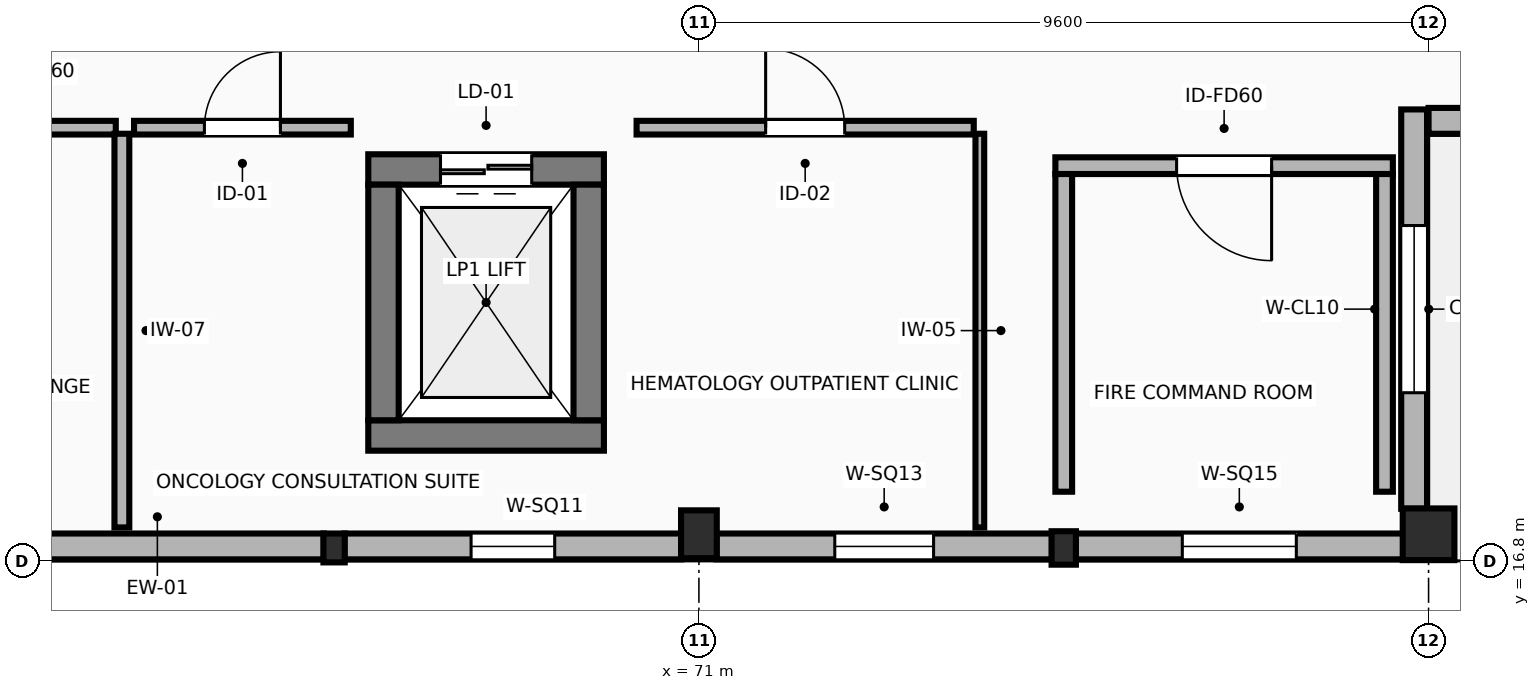
"""IFC4 building model, lengths in metres.
Left out: names, types, materials, properties, quantities, classifications, styles, units other than length and angle.
Written with IfcOpenShell. Run it as: python <this file> out.ifc"""

import sys

from ifc_helpers import new_model, si_unit, direction, frame, frame_2d, origin, origin_2d, place, context, subcontext, project, spatial, rectangle, extrude, element, fill, save


model = new_model("IFC4")
c1 = context("Model", 3, precision=1e-05, world=origin(), true_north=direction((0.0, 1.0)))
c2 = subcontext(c1, "Body", "Model", "MODEL_VIEW")
j1 = project(units=[si_unit("LENGTHUNIT", "METRE"), si_unit("PLANEANGLEUNIT", "RADIAN")], contexts=[c1])
p1 = place(None, origin())
s1 = spatial("IfcSite", under=j1, at=p1, CompositionType="ELEMENT")
p2 = place(p1, origin())
s2 = spatial("IfcBuilding", under=s1, at=p2, CompositionType="ELEMENT")
p3 = place(p2, origin())
s3 = spatial("IfcBuildingStorey", under=s2, at=p3, CompositionType="ELEMENT", Elevation=0.0)
p4 = place(p3, frame((71.0, 17.15, 0.0), z_axis=(0.0, 0.0, 1.0), x_axis=(1.0, 0.0, 0.0)))
e1 = element("IfcColumn", 1, at=p4, inside=s3, PredefinedType="COLUMN", context=c2, shape_type="SweptSolid", body=[
    extrude(rectangle(XDim=0.47, YDim=0.63, at=origin_2d()), origin(), (0.0, 0.0, 1.0), 5.4),
])
p5 = place(p3, frame((80.6, 17.15, 0.0), z_axis=(0.0, 0.0, 1.0), x_axis=(1.0, 0.0, 0.0)))
e2 = element("IfcColumn", 2, at=p5, inside=s3, PredefinedType="COLUMN", context=c2, shape_type="SweptSolid", body=[
    extrude(rectangle(XDim=0.68, YDim=0.68, at=origin_2d()), origin(), (0.0, 0.0, 1.0), 5.4),
])
p6 = place(p3, frame((66.2, 16.97, -1.75), z_axis=(0.0, 0.0, 1.0), x_axis=(1.0, 0.0, 0.0)))
e3 = element("IfcColumn", 3, at=p6, inside=s3, PredefinedType="PILASTER", context=c2, shape_type="SweptSolid", body=[
    extrude(rectangle(XDim=0.28, YDim=0.38, at=origin_2d()), origin(), (0.0, 0.0, 1.0), 7.15),
])
p7 = place(p3, frame((75.8, 16.97, -1.75), z_axis=(0.0, 0.0, 1.0), x_axis=(1.0, 0.0, 0.0)))
e4 = element("IfcColumn", 4, at=p7, inside=s3, PredefinedType="PILASTER", context=c2, shape_type="SweptSolid", body=[
    extrude(rectangle(XDim=0.32, YDim=0.44, at=origin_2d()), origin(), (0.0, 0.0, 1.0), 7.15),
])
p8 = place(p3, frame((61.685, 16.99, 0.0), z_axis=(0.0, 0.0, 1.0), x_axis=(1.0, 0.0, 0.0)))
e5 = element("IfcWall", 5, at=p8, inside=s3, PredefinedType="STANDARD", context=c2, shape_type="SweptSolid", body=[
    extrude(rectangle(XDim=4.38, YDim=0.34, at=frame_2d((2.19, 0.0))), origin(), (0.0, 0.0, 1.0), 4.385),
])
p9 = place(p3, frame((66.335, 16.99, 0.0), z_axis=(0.0, 0.0, 1.0), x_axis=(1.0, 0.0, 0.0)))
e6 = element("IfcWall", 6, at=p9, inside=s3, PredefinedType="STANDARD", context=c2, shape_type="SweptSolid", body=[
    extrude(rectangle(XDim=4.435, YDim=0.34, at=frame_2d((2.218, 0.0))), origin(), (0.0, 0.0, 1.0), 4.385),
])
p10 = place(p9, frame((1.667, 0.0, 1.35)))
e7 = element("IfcOpeningElement", 7, at=p10, cuts=e6, PredefinedType="OPENING", context=c2, shape_type="SweptSolid", body=[
    extrude(rectangle(XDim=1.1, YDim=1.1, at=frame_2d((0.55, 0.55))), frame((0.0, 0.18, 0.0), z_axis=(0.0, -1.0, 0.0), x_axis=(1.0, 0.0, 0.0)), (0.0, 0.0, 1.0), 0.36),
])
p11 = place(p3, frame((71.23, 16.99, 0.0), z_axis=(0.0, 0.0, 1.0), x_axis=(1.0, 0.0, 0.0)))
e8 = element("IfcWall", 8, at=p11, inside=s3, PredefinedType="STANDARD", context=c2, shape_type="SweptSolid", body=[
    extrude(rectangle(XDim=4.415, YDim=0.34, at=frame_2d((2.208, 0.0))), origin(), (0.0, 0.0, 1.0), 4.385),
])
p12 = place(p11, frame((1.558, 0.0, 0.95)))
e9 = element("IfcOpeningElement", 9, at=p12, cuts=e8, PredefinedType="OPENING", context=c2, shape_type="SweptSolid", body=[
    extrude(rectangle(XDim=1.3, YDim=1.3, at=frame_2d((0.65, 0.65))), frame((0.0, 0.18, 0.0), z_axis=(0.0, -1.0, 0.0), x_axis=(1.0, 0.0, 0.0)), (0.0, 0.0, 1.0), 0.36),
])
p13 = place(p3, frame((75.955, 16.99, 0.0), z_axis=(0.0, 0.0, 1.0), x_axis=(1.0, 0.0, 0.0)))
e10 = element("IfcWall", 10, at=p13, inside=s3, PredefinedType="STANDARD", context=c2, shape_type="SweptSolid", body=[
    extrude(rectangle(XDim=4.31, YDim=0.34, at=frame_2d((2.155, 0.0))), origin(), (0.0, 0.0, 1.0), 4.385),
])
p14 = place(p13, frame((1.405, 0.0, 0.95)))
e11 = element("IfcOpeningElement", 11, at=p14, cuts=e10, PredefinedType="OPENING", context=c2, shape_type="SweptSolid", body=[
    extrude(rectangle(XDim=1.5, YDim=1.5, at=frame_2d((0.75, 0.75))), frame((0.0, 0.18, 0.0), z_axis=(0.0, -1.0, 0.0), x_axis=(1.0, 0.0, 0.0)), (0.0, 0.0, 1.0), 0.36),
])
p15 = place(p3, frame((80.41, 17.485, 0.0), z_axis=(0.0, 0.0, 1.0), x_axis=(0.0, 1.0, 0.0)))
e12 = element("IfcWall", 12, at=p15, inside=s3, PredefinedType="STANDARD", context=c2, shape_type="SweptSolid", body=[
    extrude(rectangle(XDim=5.255, YDim=0.34, at=frame_2d((2.627, 0.0))), origin(), (0.0, 0.0, 1.0), 4.605),
])
p16 = place(p15, frame((1.528, 0.0, 1.75)))
e13 = element("IfcOpeningElement", 13, at=p16, cuts=e12, PredefinedType="OPENING", context=c2, shape_type="SweptSolid", body=[
    extrude(rectangle(XDim=2.2, YDim=0.85, at=frame_2d((1.1, 0.425))), frame((0.0, 0.18, 0.0), z_axis=(0.0, -1.0, 0.0), x_axis=(1.0, 0.0, 0.0)), (0.0, 0.0, 1.0), 0.36),
])
p17 = place(p3, frame((80.6, 22.59, 0.0), z_axis=(0.0, 0.0, 1.0), x_axis=(1.0, 0.0, 0.0)))
e14 = element("IfcWall", 14, at=p17, inside=s3, PredefinedType="STANDARD", context=c2, shape_type="SweptSolid", body=[
    extrude(rectangle(XDim=9.6, YDim=0.34, at=frame_2d((4.8, 0.0))), origin(), (0.0, 0.0, 1.0), 5.12),
])
p18 = place(p17, frame((3.7, 0.0, 0.0)))
e15 = element("IfcOpeningElement", 15, at=p18, cuts=e14, PredefinedType="OPENING", context=c2, shape_type="SweptSolid", body=[
    extrude(rectangle(XDim=2.2, YDim=2.5, at=frame_2d((1.1, 1.25))), frame((0.0, 0.18, 0.0), z_axis=(0.0, -1.0, 0.0), x_axis=(1.0, 0.0, 0.0)), (0.0, 0.0, 1.0), 0.36),
])
p19 = place(p3, frame((66.65, 18.45, 0.0), z_axis=(0.0, 0.0, 1.0), x_axis=(1.0, 0.0, 0.0)))
e16 = element("IfcWall", 16, at=p19, inside=s3, PredefinedType="SHEAR", context=c2, shape_type="SweptSolid", body=[
    extrude(rectangle(XDim=3.1, YDim=0.4, at=frame_2d((1.55, 0.0))), origin(), (0.0, 0.0, 1.0), 5.4),
])
p20 = place(p3, frame((69.75, 21.95, 0.0), z_axis=(0.0, 0.0, 1.0), x_axis=(-1.0, 0.0, 0.0)))
e17 = element("IfcWall", 17, at=p20, inside=s3, PredefinedType="SHEAR", context=c2, shape_type="SweptSolid", body=[
    extrude(rectangle(XDim=3.1, YDim=0.4, at=frame_2d((1.55, 0.0))), origin(), (0.0, 0.0, 1.0), 5.4),
])
p21 = place(p20, frame((0.95, 0.0, 0.0)))
e18 = element("IfcOpeningElement", 18, at=p21, cuts=e17, PredefinedType="OPENING", context=c2, shape_type="SweptSolid", body=[
    extrude(rectangle(XDim=1.2, YDim=2.2, at=frame_2d((0.6, 1.1))), frame((0.0, 0.21, 0.0), z_axis=(0.0, -1.0, 0.0), x_axis=(1.0, 0.0, 0.0)), (0.0, 0.0, 1.0), 0.42),
])
for number, where, z_axis, x_axis in (
    (19, (66.85, 18.65, 0.0), (0.0, 0.0, 1.0), (0.0, 1.0, 0.0)),
    (20, (69.55, 21.75, 0.0), (0.0, 0.0, 1.0), (0.0, -1.0, 0.0)),
):
    element("IfcWall", number, at=place(p3, frame(where, z_axis=z_axis, x_axis=x_axis)), inside=s3, PredefinedType="SHEAR", context=c2, shape_type="SweptSolid", body=[
        extrude(rectangle(XDim=3.1, YDim=0.4, at=frame_2d((1.55, 0.0))), origin(), (0.0, 0.0, 1.0), 5.4),
    ])
p22 = place(p3, frame((80.13, 22.0, 0.0), z_axis=(0.0, 0.0, 1.0), x_axis=(-1.0, 0.0, 0.0)))
e21 = element("IfcWall", 21, at=p22, inside=s3, PredefinedType="PARTITIONING", context=c2, shape_type="SweptSolid", body=[
    extrude(rectangle(XDim=4.44, YDim=0.22, at=frame_2d((2.22, 0.0))), origin(), (0.0, 0.0, 1.0), 5.12),
])
p23 = place(p22, frame((1.595, 0.0, 0.0)))
e22 = element("IfcOpeningElement", 22, at=p23, cuts=e21, PredefinedType="OPENING", context=c2, shape_type="SweptSolid", body=[
    extrude(rectangle(XDim=1.25, YDim=2.2, at=frame_2d((0.625, 1.1))), frame((0.0, 0.12, 0.0), z_axis=(0.0, -1.0, 0.0), x_axis=(1.0, 0.0, 0.0)), (0.0, 0.0, 1.0), 0.24),
])
for number, where, z_axis, x_axis in (
    (23, (75.8, 17.71, 0.0), (0.0, 0.0, 1.0), (0.0, 1.0, 0.0)),
    (24, (80.02, 21.89, 0.0), (0.0, 0.0, 1.0), (0.0, -1.0, 0.0)),
):
    element("IfcWall", number, at=place(p3, frame(where, z_axis=z_axis, x_axis=x_axis)), inside=s3, PredefinedType="PARTITIONING", context=c2, shape_type="SweptSolid", body=[
        extrude(rectangle(XDim=4.18, YDim=0.22, at=frame_2d((2.09, 0.0))), origin(), (0.0, 0.0, 1.0), 5.12),
    ])
p24 = place(p3, frame((57.924, 22.5, 0.0), z_axis=(0.0, 0.0, 1.0), x_axis=(1.0, 0.0, 0.0)))
e25 = element("IfcWall", 25, at=p24, inside=s3, PredefinedType="PARTITIONING", context=c2, shape_type="SweptSolid", body=[
    extrude(rectangle(XDim=5.404, YDim=0.18, at=frame_2d((2.702, 0.0))), origin(), (0.0, 0.0, 1.0), 5.12),
])
p25 = place(p24, frame((2.112, 0.0, 0.0)))
e26 = element("IfcOpeningElement", 26, at=p25, cuts=e25, PredefinedType="OPENING", context=c2, shape_type="SweptSolid", body=[
    extrude(rectangle(XDim=1.18, YDim=2.18, at=frame_2d((0.59, 1.09))), frame((0.0, 0.1, 0.0), z_axis=(0.0, -1.0, 0.0), x_axis=(1.0, 0.0, 0.0)), (0.0, 0.0, 1.0), 0.2),
])
p26 = place(p3, frame((63.408, 22.42, 0.0), z_axis=(0.0, 0.0, 1.0), x_axis=(0.0, -1.0, 0.0)))
e27 = element("IfcWall", 27, at=p26, inside=s3, PredefinedType="PARTITIONING", context=c2, shape_type="SweptSolid", body=[
    extrude(rectangle(XDim=5.18, YDim=0.195, at=frame_2d((2.59, 0.0))), origin(), (0.0, 0.0, 1.0), 5.12),
])
p27 = place(p3, frame((63.568, 22.5, 0.0), z_axis=(0.0, 0.0, 1.0), x_axis=(1.0, 0.0, 0.0)))
e28 = element("IfcWall", 28, at=p27, inside=s3, PredefinedType="PARTITIONING", context=c2, shape_type="SweptSolid", body=[
    extrude(rectangle(XDim=2.852, YDim=0.18, at=frame_2d((1.426, 0.0))), origin(), (0.0, 0.0, 1.0), 5.12),
])
p28 = place(p27, frame((0.926, 0.0, 0.0)))
e29 = element("IfcOpeningElement", 29, at=p28, cuts=e28, PredefinedType="OPENING", context=c2, shape_type="SweptSolid", body=[
    extrude(rectangle(XDim=1.0, YDim=2.15, at=frame_2d((0.5, 1.075))), frame((0.0, 0.1, 0.0), z_axis=(0.0, -1.0, 0.0), x_axis=(1.0, 0.0, 0.0)), (0.0, 0.0, 1.0), 0.2),
])
p29 = place(p3, frame((70.18, 22.5, 0.0), z_axis=(0.0, 0.0, 1.0), x_axis=(1.0, 0.0, 0.0)))
e30 = element("IfcWall", 30, at=p29, inside=s3, PredefinedType="PARTITIONING", context=c2, shape_type="SweptSolid", body=[
    extrude(rectangle(XDim=4.436, YDim=0.18, at=frame_2d((2.218, 0.0))), origin(), (0.0, 0.0, 1.0), 5.12),
])
p30 = place(p29, frame((1.698, 0.0, 0.0)))
e31 = element("IfcOpeningElement", 31, at=p30, cuts=e30, PredefinedType="OPENING", context=c2, shape_type="SweptSolid", body=[
    extrude(rectangle(XDim=1.04, YDim=2.15, at=frame_2d((0.52, 1.075))), frame((0.0, 0.1, 0.0), z_axis=(0.0, -1.0, 0.0), x_axis=(1.0, 0.0, 0.0)), (0.0, 0.0, 1.0), 0.2),
])
p31 = place(p3, frame((74.696, 22.42, 0.0), z_axis=(0.0, 0.0, 1.0), x_axis=(0.0, -1.0, 0.0)))
e32 = element("IfcWall", 32, at=p31, inside=s3, PredefinedType="PARTITIONING", context=c2, shape_type="SweptSolid", body=[
    extrude(rectangle(XDim=5.18, YDim=0.115, at=frame_2d((2.59, 0.0))), origin(), (0.0, 0.0, 1.0), 5.12),
])
p32 = place(p10, origin())
e33 = element("IfcWindow", 33, at=p32, inside=s3, PartitioningType="SINGLE_PANEL", PredefinedType="WINDOW", context=c2, shape_type="SweptSolid", body=[
    extrude(rectangle(XDim=1.1, YDim=1.1, at=frame_2d((0.55, 0.55))), frame((0.0, 0.03, 0.0), z_axis=(0.0, -1.0, 0.0), x_axis=(1.0, 0.0, 0.0)), (0.0, 0.0, 1.0), 0.06),
])
fill(e7, e33)
p33 = place(p12, origin())
e34 = element("IfcWindow", 34, at=p33, inside=s3, PartitioningType="SINGLE_PANEL", PredefinedType="WINDOW", context=c2, shape_type="SweptSolid", body=[
    extrude(rectangle(XDim=1.3, YDim=1.3, at=frame_2d((0.65, 0.65))), frame((0.0, 0.03, 0.0), z_axis=(0.0, -1.0, 0.0), x_axis=(1.0, 0.0, 0.0)), (0.0, 0.0, 1.0), 0.06),
])
fill(e9, e34)
p34 = place(p14, origin())
e35 = element("IfcWindow", 35, at=p34, inside=s3, PartitioningType="SINGLE_PANEL", PredefinedType="WINDOW", context=c2, shape_type="SweptSolid", body=[
    extrude(rectangle(XDim=1.5, YDim=1.5, at=frame_2d((0.75, 0.75))), frame((0.0, 0.03, 0.0), z_axis=(0.0, -1.0, 0.0), x_axis=(1.0, 0.0, 0.0)), (0.0, 0.0, 1.0), 0.06),
])
fill(e11, e35)
p35 = place(p16, origin())
e36 = element("IfcWindow", 36, at=p35, inside=s3, PartitioningType="SINGLE_PANEL", PredefinedType="WINDOW", context=c2, shape_type="SweptSolid", body=[
    extrude(rectangle(XDim=2.2, YDim=0.85, at=frame_2d((1.1, 0.425))), frame((0.0, 0.03, 0.0), z_axis=(0.0, -1.0, 0.0), x_axis=(1.0, 0.0, 0.0)), (0.0, 0.0, 1.0), 0.06),
])
fill(e13, e36)
p36 = place(p21, origin())
e37 = element("IfcDoor", 37, at=p36, inside=s3, OperationType="DOUBLE_DOOR_SLIDING", PredefinedType="DOOR", context=c2, shape_type="SweptSolid", body=[
    extrude(rectangle(XDim=1.2, YDim=2.2, at=frame_2d((0.6, 1.1))), frame((0.0, 0.025, 0.0), z_axis=(0.0, -1.0, 0.0), x_axis=(1.0, 0.0, 0.0)), (0.0, 0.0, 1.0), 0.05),
])
fill(e18, e37)
p37 = place(p23, origin())
e38 = element("IfcDoor", 38, at=p37, inside=s3, OperationType="SINGLE_SWING_LEFT", PredefinedType="DOOR", context=c2, shape_type="SweptSolid", body=[
    extrude(rectangle(XDim=1.25, YDim=2.2, at=frame_2d((0.625, 1.1))), frame((0.0, 0.025, 0.0), z_axis=(0.0, -1.0, 0.0), x_axis=(1.0, 0.0, 0.0)), (0.0, 0.0, 1.0), 0.05),
])
fill(e22, e38)
p38 = place(p28, origin())
e39 = element("IfcDoor", 39, at=p38, inside=s3, OperationType="SINGLE_SWING_RIGHT", PredefinedType="DOOR", context=c2, shape_type="SweptSolid", body=[
    extrude(rectangle(XDim=1.0, YDim=2.15, at=frame_2d((0.5, 1.075))), frame((0.0, 0.025, 0.0), z_axis=(0.0, -1.0, 0.0), x_axis=(1.0, 0.0, 0.0)), (0.0, 0.0, 1.0), 0.05),
])
fill(e29, e39)
p39 = place(p30, origin())
e40 = element("IfcDoor", 40, at=p39, inside=s3, OperationType="SINGLE_SWING_LEFT", PredefinedType="DOOR", context=c2, shape_type="SweptSolid", body=[
    extrude(rectangle(XDim=1.04, YDim=2.15, at=frame_2d((0.52, 1.075))), frame((0.0, 0.025, 0.0), z_axis=(0.0, -1.0, 0.0), x_axis=(1.0, 0.0, 0.0)), (0.0, 0.0, 1.0), 0.05),
])
fill(e31, e40)
save(model, sys.argv[1])
